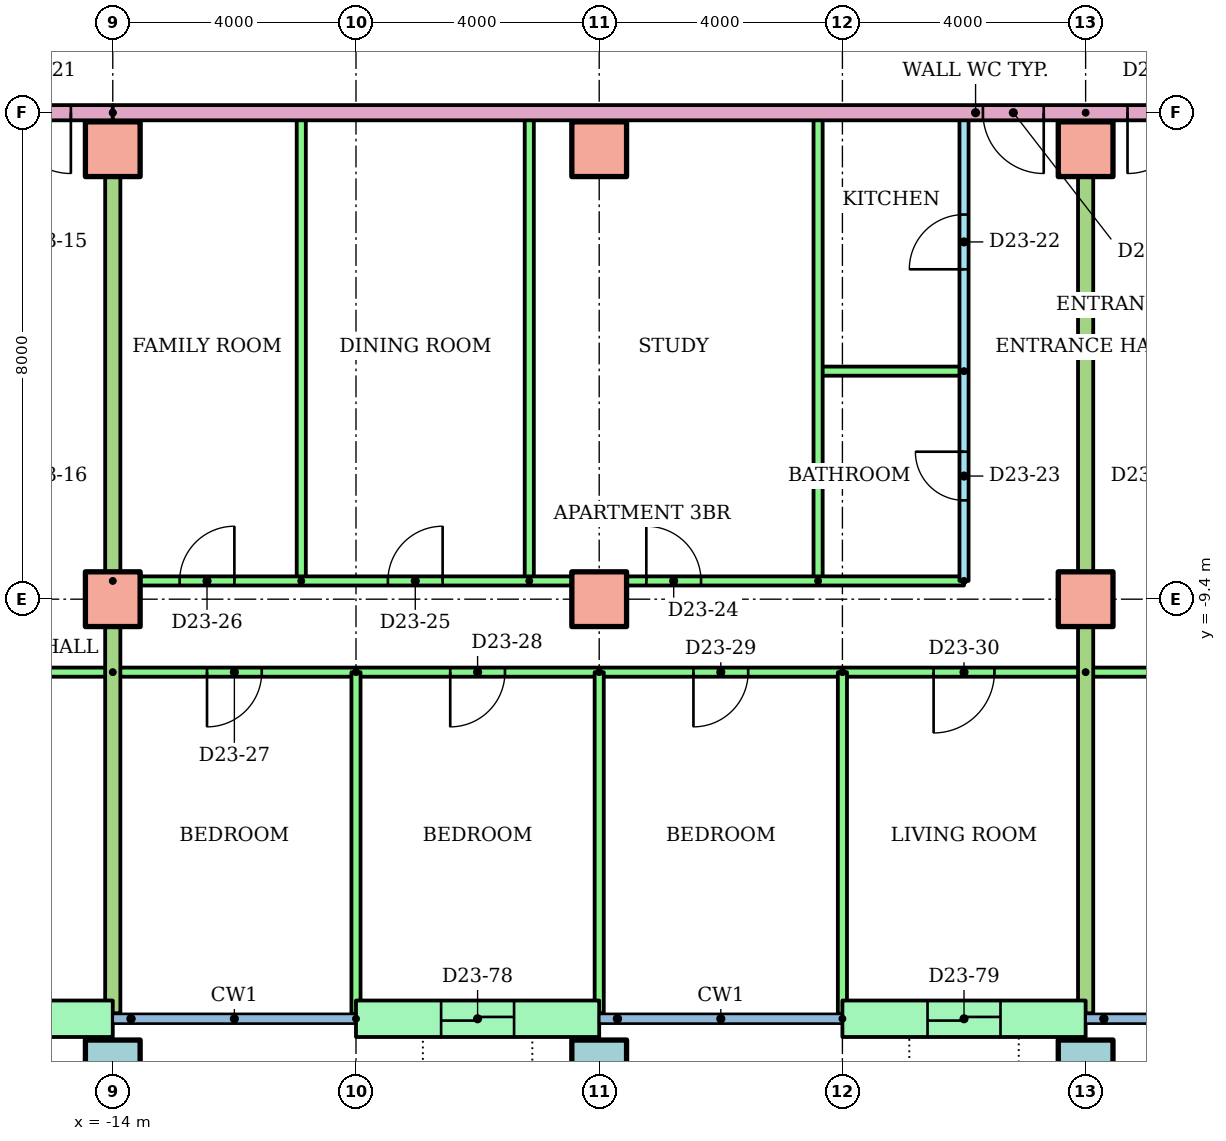
"""IFC4 building model, lengths in metres.
Left out: names, types, materials, properties, quantities, classifications, styles, units other than length and angle.
Written with IfcOpenShell. Run it as: python <this file> out.ifc"""

import sys

from ifc_helpers import new_model, si_unit, direction, frame, frame_2d, origin, origin_2d, place, context, subcontext, project, spatial, rectangle, hollow_rectangle, extrude, element, fill, save


model = new_model("IFC4")
c1 = context("Model", 3, precision=1e-05, world=origin(), true_north=direction((0.0, 1.0)))
c2 = subcontext(c1, "Body", "Model", "MODEL_VIEW")
j1 = project(units=[si_unit("LENGTHUNIT", "METRE"), si_unit("PLANEANGLEUNIT", "RADIAN")], contexts=[c1])
p1 = place(None, origin())
s1 = spatial("IfcSite", under=j1, at=p1, CompositionType="ELEMENT")
p2 = place(p1, origin())
s2 = spatial("IfcBuilding", under=s1, at=p2, CompositionType="ELEMENT")
p3 = place(p2, frame((0.0, 0.0, 90.3)))
s3 = spatial("IfcBuildingStorey", under=s2, at=p3, CompositionType="ELEMENT", Elevation=90.3)
for number, where in (
    (1, (-14.0, -17.1, 0.0)),
    (2, (-6.0, -17.1, 0.0)),
    (3, (2.0, -17.1, 0.0)),
):
    element("IfcColumn", number, at=place(p3, frame(where)), inside=s3, PredefinedType="COLUMN", context=c2, shape_type="SweptSolid", body=[
        extrude(hollow_rectangle(XDim=0.9, YDim=0.9, WallThickness=0.045, at=origin_2d()), origin(), (0.0, 0.0, 1.0), 3.2),
    ])
for number, where in (
    (4, (-14.0, -9.4, 0.0)),
    (5, (-6.0, -9.4, 0.0)),
    (6, (2.0, -9.4, 0.0)),
    (7, (-14.0, -2.0, 0.0)),
    (8, (-6.0, -2.0, 0.0)),
    (9, (2.0, -2.0, 0.0)),
):
    element("IfcColumn", number, at=place(p3, frame(where)), inside=s3, PredefinedType="COLUMN", context=c2, shape_type="SweptSolid", body=[
        extrude(rectangle(XDim=0.9, YDim=0.9, at=origin_2d()), origin(), (0.0, 0.0, 1.0), 3.2),
    ])
p4 = place(p3, frame((-18.0, -16.3, 0.0)))
e10 = element("IfcWall", 10, at=p4, inside=s3, PredefinedType="STANDARD", context=c2, shape_type="SweptSolid", body=[
    extrude(rectangle(XDim=4.0, YDim=0.6, at=frame_2d((2.0, 0.0))), origin(), (0.0, 0.0, 1.0), 2.92),
])
p5 = place(p4, frame((1.4, 0.0, 0.0)))
e11 = element("IfcOpeningElement", 11, at=p5, cuts=e10, PredefinedType="OPENING", context=c2, shape_type="SweptSolid", body=[
    extrude(rectangle(XDim=1.2, YDim=2.1, at=frame_2d((0.6, 1.05))), frame((0.0, 0.31, 0.0), z_axis=(0.0, -1.0, 0.0), x_axis=(1.0, 0.0, 0.0)), (0.0, 0.0, 1.0), 0.62),
])
p6 = place(p3, frame((-10.0, -16.3, 0.0)))
e12 = element("IfcWall", 12, at=p6, inside=s3, PredefinedType="STANDARD", context=c2, shape_type="SweptSolid", body=[
    extrude(rectangle(XDim=4.0, YDim=0.6, at=frame_2d((2.0, 0.0))), origin(), (0.0, 0.0, 1.0), 2.92),
])
p7 = place(p6, frame((1.4, 0.0, 0.0)))
e13 = element("IfcOpeningElement", 13, at=p7, cuts=e12, PredefinedType="OPENING", context=c2, shape_type="SweptSolid", body=[
    extrude(rectangle(XDim=1.2, YDim=2.1, at=frame_2d((0.6, 1.05))), frame((0.0, 0.31, 0.0), z_axis=(0.0, -1.0, 0.0), x_axis=(1.0, 0.0, 0.0)), (0.0, 0.0, 1.0), 0.62),
])
p8 = place(p3, frame((-2.0, -16.3, 0.0)))
e14 = element("IfcWall", 14, at=p8, inside=s3, PredefinedType="STANDARD", context=c2, shape_type="SweptSolid", body=[
    extrude(rectangle(XDim=4.0, YDim=0.6, at=frame_2d((2.0, 0.0))), origin(), (0.0, 0.0, 1.0), 2.92),
])
p9 = place(p8, frame((1.4, 0.0, 0.0)))
e15 = element("IfcOpeningElement", 15, at=p9, cuts=e14, PredefinedType="OPENING", context=c2, shape_type="SweptSolid", body=[
    extrude(rectangle(XDim=1.2, YDim=2.1, at=frame_2d((0.6, 1.05))), frame((0.0, 0.31, 0.0), z_axis=(0.0, -1.0, 0.0), x_axis=(1.0, 0.0, 0.0)), (0.0, 0.0, 1.0), 0.62),
])
p10 = place(p3, frame((-14.0, -10.6, 0.0), z_axis=(0.0, 0.0, 1.0), x_axis=(-1.0, 0.0, 0.0)))
e16 = element("IfcWall", 16, at=p10, inside=s3, PredefinedType="PARTITIONING", context=c2, shape_type="SweptSolid", body=[
    extrude(rectangle(XDim=14.62, YDim=0.15, at=frame_2d((7.31, 0.0))), origin(), (0.0, 0.0, 1.0), 2.4),
])
p11 = place(p10, frame((11.7, 0.0, 0.0)))
e17 = element("IfcOpeningElement", 17, at=p11, cuts=e16, PredefinedType="OPENING", context=c2, shape_type="SweptSolid", body=[
    extrude(rectangle(XDim=0.9, YDim=2.1, at=frame_2d((0.45, 1.05))), frame((0.0, 0.085, 0.0), z_axis=(0.0, -1.0, 0.0), x_axis=(1.0, 0.0, 0.0)), (0.0, 0.0, 1.0), 0.17),
])
p12 = place(p10, frame((4.45, 0.0, 0.0)))
e18 = element("IfcOpeningElement", 18, at=p12, cuts=e16, PredefinedType="OPENING", context=c2, shape_type="SweptSolid", body=[
    extrude(rectangle(XDim=1.0, YDim=2.1, at=frame_2d((0.5, 1.05))), frame((0.0, 0.085, 0.0), z_axis=(0.0, -1.0, 0.0), x_axis=(1.0, 0.0, 0.0)), (0.0, 0.0, 1.0), 0.17),
])
p13 = place(p3, frame((0.0, -9.1, 0.0), z_axis=(0.0, 0.0, 1.0), x_axis=(0.0, 1.0, 0.0)))
e19 = element("IfcWall", 19, at=p13, inside=s3, PredefinedType="PARTITIONING", context=c2, shape_type="SweptSolid", body=[
    extrude(rectangle(XDim=7.7, YDim=0.15, at=frame_2d((3.85, 0.0))), origin(), (0.0, 0.0, 1.0), 2.4),
])
p14 = place(p13, frame((5.125, 0.0, 0.0)))
e20 = element("IfcOpeningElement", 20, at=p14, cuts=e19, PredefinedType="OPENING", context=c2, shape_type="SweptSolid", body=[
    extrude(rectangle(XDim=0.9, YDim=2.1, at=frame_2d((0.45, 1.05))), frame((0.0, 0.085, 0.0), z_axis=(0.0, -1.0, 0.0), x_axis=(1.0, 0.0, 0.0)), (0.0, 0.0, 1.0), 0.17),
])
p15 = place(p13, frame((1.325, 0.0, 0.0)))
e21 = element("IfcOpeningElement", 21, at=p15, cuts=e19, PredefinedType="OPENING", context=c2, shape_type="SweptSolid", body=[
    extrude(rectangle(XDim=0.8, YDim=2.1, at=frame_2d((0.4, 1.05))), frame((0.0, 0.085, 0.0), z_axis=(0.0, -1.0, 0.0), x_axis=(1.0, 0.0, 0.0)), (0.0, 0.0, 1.0), 0.17),
])
p16 = place(p3, frame((0.0, -5.65, 0.0), z_axis=(0.0, 0.0, 1.0), x_axis=(-1.0, 0.0, 0.0)))
e22 = element("IfcWall", 22, at=p16, inside=s3, PredefinedType="PARTITIONING", context=c2, shape_type="SweptSolid", body=[
    extrude(rectangle(XDim=2.4, YDim=0.15, at=frame_2d((1.2, 0.0))), origin(), (0.0, 0.0, 1.0), 2.4),
])
for number, where, z_axis, x_axis in (
    (23, (-2.4, -9.1, 0.0), (0.0, 0.0, 1.0), (0.0, 1.0, 0.0)),
    (24, (-7.15, -9.1, 0.0), (0.0, 0.0, 1.0), (0.0, 1.0, 0.0)),
    (25, (-10.9, -9.1, 0.0), (0.0, 0.0, 1.0), (0.0, 1.0, 0.0)),
):
    element("IfcWall", number, at=place(p3, frame(where, z_axis=z_axis, x_axis=x_axis)), inside=s3, PredefinedType="PARTITIONING", context=c2, shape_type="SweptSolid", body=[
        extrude(rectangle(XDim=7.7, YDim=0.15, at=frame_2d((3.85, 0.0))), origin(), (0.0, 0.0, 1.0), 2.4),
    ])
p17 = place(p3, frame((-14.0, -9.1, 0.0)))
e26 = element("IfcWall", 26, at=p17, inside=s3, PredefinedType="PARTITIONING", context=c2, shape_type="SweptSolid", body=[
    extrude(rectangle(XDim=14.0, YDim=0.15, at=frame_2d((7.0, 0.0))), origin(), (0.0, 0.0, 1.0), 2.4),
])
p18 = place(p17, frame((8.775, 0.0, 0.0)))
e27 = element("IfcOpeningElement", 27, at=p18, cuts=e26, PredefinedType="OPENING", context=c2, shape_type="SweptSolid", body=[
    extrude(rectangle(XDim=0.9, YDim=2.1, at=frame_2d((0.45, 1.05))), frame((0.0, 0.085, 0.0), z_axis=(0.0, -1.0, 0.0), x_axis=(1.0, 0.0, 0.0)), (0.0, 0.0, 1.0), 0.17),
])
p19 = place(p17, frame((4.525, 0.0, 0.0)))
e28 = element("IfcOpeningElement", 28, at=p19, cuts=e26, PredefinedType="OPENING", context=c2, shape_type="SweptSolid", body=[
    extrude(rectangle(XDim=0.9, YDim=2.1, at=frame_2d((0.45, 1.05))), frame((0.0, 0.085, 0.0), z_axis=(0.0, -1.0, 0.0), x_axis=(1.0, 0.0, 0.0)), (0.0, 0.0, 1.0), 0.17),
])
p20 = place(p17, frame((1.1, 0.0, 0.0)))
e29 = element("IfcOpeningElement", 29, at=p20, cuts=e26, PredefinedType="OPENING", context=c2, shape_type="SweptSolid", body=[
    extrude(rectangle(XDim=0.9, YDim=2.1, at=frame_2d((0.45, 1.05))), frame((0.0, 0.085, 0.0), z_axis=(0.0, -1.0, 0.0), x_axis=(1.0, 0.0, 0.0)), (0.0, 0.0, 1.0), 0.17),
])
p21 = place(p3, frame((2.0, -10.6, 0.0), z_axis=(0.0, 0.0, 1.0), x_axis=(-1.0, 0.0, 0.0)))
e30 = element("IfcWall", 30, at=p21, inside=s3, PredefinedType="PARTITIONING", context=c2, shape_type="SweptSolid", body=[
    extrude(rectangle(XDim=16.0, YDim=0.15, at=frame_2d((8.0, 0.0))), origin(), (0.0, 0.0, 1.0), 2.4),
])
p22 = place(p21, frame((13.55, 0.0, 0.0)))
e31 = element("IfcOpeningElement", 31, at=p22, cuts=e30, PredefinedType="OPENING", context=c2, shape_type="SweptSolid", body=[
    extrude(rectangle(XDim=0.9, YDim=2.1, at=frame_2d((0.45, 1.05))), frame((0.0, 0.085, 0.0), z_axis=(0.0, -1.0, 0.0), x_axis=(1.0, 0.0, 0.0)), (0.0, 0.0, 1.0), 0.17),
])
p23 = place(p21, frame((9.55, 0.0, 0.0)))
e32 = element("IfcOpeningElement", 32, at=p23, cuts=e30, PredefinedType="OPENING", context=c2, shape_type="SweptSolid", body=[
    extrude(rectangle(XDim=0.9, YDim=2.1, at=frame_2d((0.45, 1.05))), frame((0.0, 0.085, 0.0), z_axis=(0.0, -1.0, 0.0), x_axis=(1.0, 0.0, 0.0)), (0.0, 0.0, 1.0), 0.17),
])
p24 = place(p21, frame((5.55, 0.0, 0.0)))
e33 = element("IfcOpeningElement", 33, at=p24, cuts=e30, PredefinedType="OPENING", context=c2, shape_type="SweptSolid", body=[
    extrude(rectangle(XDim=0.9, YDim=2.1, at=frame_2d((0.45, 1.05))), frame((0.0, 0.085, 0.0), z_axis=(0.0, -1.0, 0.0), x_axis=(1.0, 0.0, 0.0)), (0.0, 0.0, 1.0), 0.17),
])
p25 = place(p21, frame((1.5, 0.0, 0.0)))
e34 = element("IfcOpeningElement", 34, at=p25, cuts=e30, PredefinedType="OPENING", context=c2, shape_type="SweptSolid", body=[
    extrude(rectangle(XDim=1.0, YDim=2.1, at=frame_2d((0.5, 1.05))), frame((0.0, 0.085, 0.0), z_axis=(0.0, -1.0, 0.0), x_axis=(1.0, 0.0, 0.0)), (0.0, 0.0, 1.0), 0.17),
])
p26 = place(p3, frame((-10.0, -10.6, 0.0), z_axis=(0.0, 0.0, 1.0), x_axis=(0.0, -1.0, 0.0)))
e35 = element("IfcWall", 35, at=p26, inside=s3, PredefinedType="PARTITIONING", context=c2, shape_type="SweptSolid", body=[
    extrude(rectangle(XDim=5.621, YDim=0.15, at=frame_2d((2.811, 0.0))), origin(), (0.0, 0.0, 1.0), 2.4),
])
p27 = place(p3, frame((-6.0, -10.6, 0.0), z_axis=(0.0, 0.0, 1.0), x_axis=(0.0, -1.0, 0.0)))
e36 = element("IfcWall", 36, at=p27, inside=s3, PredefinedType="PARTITIONING", context=c2, shape_type="SweptSolid", body=[
    extrude(rectangle(XDim=5.61, YDim=0.15, at=frame_2d((2.805, 0.0))), origin(), (0.0, 0.0, 1.0), 2.4),
])
p28 = place(p3, frame((-2.0, -10.6, 0.0), z_axis=(0.0, 0.0, 1.0), x_axis=(0.0, -1.0, 0.0)))
e37 = element("IfcWall", 37, at=p28, inside=s3, PredefinedType="PARTITIONING", context=c2, shape_type="SweptSolid", body=[
    extrude(rectangle(XDim=5.621, YDim=0.15, at=frame_2d((2.811, 0.0))), origin(), (0.0, 0.0, 1.0), 2.4),
])
p29 = place(p3, frame((-14.0, -1.4, 0.0), z_axis=(0.0, 0.0, 1.0), x_axis=(0.0, -1.0, 0.0)))
e38 = element("IfcWall", 38, at=p29, inside=s3, PredefinedType="PARTITIONING", context=c2, shape_type="SweptSolid", body=[
    extrude(rectangle(XDim=14.81, YDim=0.25, at=frame_2d((7.405, 0.0))), origin(), (0.0, 0.0, 1.0), 2.4),
])
p30 = place(p3, frame((18.0, -10.6, 0.0), z_axis=(0.0, 0.0, 1.0), x_axis=(-1.0, 0.0, 0.0)))
e39 = element("IfcWall", 39, at=p30, inside=s3, PredefinedType="PARTITIONING", context=c2, shape_type="SweptSolid", body=[
    extrude(rectangle(XDim=16.0, YDim=0.15, at=frame_2d((8.0, 0.0))), origin(), (0.0, 0.0, 1.0), 2.4),
])
p31 = place(p30, frame((13.55, 0.0, 0.0)))
e40 = element("IfcOpeningElement", 40, at=p31, cuts=e39, PredefinedType="OPENING", context=c2, shape_type="SweptSolid", body=[
    extrude(rectangle(XDim=0.9, YDim=2.1, at=frame_2d((0.45, 1.05))), frame((0.0, 0.085, 0.0), z_axis=(0.0, -1.0, 0.0), x_axis=(1.0, 0.0, 0.0)), (0.0, 0.0, 1.0), 0.17),
])
p32 = place(p30, frame((9.55, 0.0, 0.0)))
e41 = element("IfcOpeningElement", 41, at=p32, cuts=e39, PredefinedType="OPENING", context=c2, shape_type="SweptSolid", body=[
    extrude(rectangle(XDim=0.9, YDim=2.1, at=frame_2d((0.45, 1.05))), frame((0.0, 0.085, 0.0), z_axis=(0.0, -1.0, 0.0), x_axis=(1.0, 0.0, 0.0)), (0.0, 0.0, 1.0), 0.17),
])
p33 = place(p30, frame((5.55, 0.0, 0.0)))
e42 = element("IfcOpeningElement", 42, at=p33, cuts=e39, PredefinedType="OPENING", context=c2, shape_type="SweptSolid", body=[
    extrude(rectangle(XDim=0.9, YDim=2.1, at=frame_2d((0.45, 1.05))), frame((0.0, 0.085, 0.0), z_axis=(0.0, -1.0, 0.0), x_axis=(1.0, 0.0, 0.0)), (0.0, 0.0, 1.0), 0.17),
])
p34 = place(p30, frame((1.5, 0.0, 0.0)))
e43 = element("IfcOpeningElement", 43, at=p34, cuts=e39, PredefinedType="OPENING", context=c2, shape_type="SweptSolid", body=[
    extrude(rectangle(XDim=1.0, YDim=2.1, at=frame_2d((0.5, 1.05))), frame((0.0, 0.085, 0.0), z_axis=(0.0, -1.0, 0.0), x_axis=(1.0, 0.0, 0.0)), (0.0, 0.0, 1.0), 0.17),
])
p35 = place(p3, frame((2.0, -1.4, 0.0), z_axis=(0.0, 0.0, 1.0), x_axis=(0.0, -1.0, 0.0)))
e44 = element("IfcWall", 44, at=p35, inside=s3, PredefinedType="PARTITIONING", context=c2, shape_type="SweptSolid", body=[
    extrude(rectangle(XDim=14.81, YDim=0.25, at=frame_2d((7.405, 0.0))), origin(), (0.0, 0.0, 1.0), 2.4),
])
p36 = place(p3, frame((-14.0, -1.4, 0.0), z_axis=(0.0, 0.0, 1.0), x_axis=(-1.0, 0.0, 0.0)))
e45 = element("IfcWall", 45, at=p36, inside=s3, PredefinedType="PARTITIONING", context=c2, shape_type="SweptSolid", body=[
    extrude(rectangle(XDim=14.62, YDim=0.25, at=frame_2d((7.31, 0.0))), origin(), (0.0, 0.0, 1.0), 2.4),
])
p37 = place(p36, frame((0.689, 0.0, 0.0)))
e46 = element("IfcOpeningElement", 46, at=p37, cuts=e45, PredefinedType="OPENING", context=c2, shape_type="SweptSolid", body=[
    extrude(rectangle(XDim=1.0, YDim=2.1, at=frame_2d((0.5, 1.05))), frame((0.0, 0.135, 0.0), z_axis=(0.0, -1.0, 0.0), x_axis=(1.0, 0.0, 0.0)), (0.0, 0.0, 1.0), 0.27),
])
p38 = place(p3, frame((14.0, -1.4, 0.0), z_axis=(0.0, 0.0, 1.0), x_axis=(-1.0, 0.0, 0.0)))
e47 = element("IfcWall", 47, at=p38, inside=s3, PredefinedType="PARTITIONING", context=c2, shape_type="SweptSolid", body=[
    extrude(rectangle(XDim=28.0, YDim=0.25, at=frame_2d((14.0, 0.0))), origin(), (0.0, 0.0, 1.0), 2.4),
])
p39 = place(p38, frame((12.689, 0.0, 0.0)))
e48 = element("IfcOpeningElement", 48, at=p39, cuts=e47, PredefinedType="OPENING", context=c2, shape_type="SweptSolid", body=[
    extrude(rectangle(XDim=1.0, YDim=2.1, at=frame_2d((0.5, 1.05))), frame((0.0, 0.135, 0.0), z_axis=(0.0, -1.0, 0.0), x_axis=(1.0, 0.0, 0.0)), (0.0, 0.0, 1.0), 0.27),
])
p40 = place(p38, frame((10.311, 0.0, 0.0)))
e49 = element("IfcOpeningElement", 49, at=p40, cuts=e47, PredefinedType="OPENING", context=c2, shape_type="SweptSolid", body=[
    extrude(rectangle(XDim=1.0, YDim=2.1, at=frame_2d((0.5, 1.05))), frame((0.0, 0.135, 0.0), z_axis=(0.0, -1.0, 0.0), x_axis=(1.0, 0.0, 0.0)), (0.0, 0.0, 1.0), 0.27),
])
p41 = place(p37, origin())
e50 = element("IfcDoor", 50, at=p41, inside=s3, OperationType="SINGLE_SWING_LEFT", PredefinedType="DOOR", context=c2, shape_type="SweptSolid", body=[
    extrude(rectangle(XDim=1.0, YDim=2.1, at=frame_2d((0.5, 1.05))), frame((0.0, 0.025, 0.0), z_axis=(0.0, -1.0, 0.0), x_axis=(1.0, 0.0, 0.0)), (0.0, 0.0, 1.0), 0.05),
])
fill(e46, e50)
p42 = place(p14, origin())
e51 = element("IfcDoor", 51, at=p42, inside=s3, OperationType="SINGLE_SWING_LEFT", PredefinedType="DOOR", context=c2, shape_type="SweptSolid", body=[
    extrude(rectangle(XDim=0.9, YDim=2.1, at=frame_2d((0.45, 1.05))), frame((0.0, 0.025, 0.0), z_axis=(0.0, -1.0, 0.0), x_axis=(1.0, 0.0, 0.0)), (0.0, 0.0, 1.0), 0.05),
])
fill(e20, e51)
p43 = place(p15, origin())
e52 = element("IfcDoor", 52, at=p43, inside=s3, OperationType="SINGLE_SWING_RIGHT", PredefinedType="DOOR", context=c2, shape_type="SweptSolid", body=[
    extrude(rectangle(XDim=0.8, YDim=2.1, at=frame_2d((0.4, 1.05))), frame((0.0, 0.025, 0.0), z_axis=(0.0, -1.0, 0.0), x_axis=(1.0, 0.0, 0.0)), (0.0, 0.0, 1.0), 0.05),
])
fill(e21, e52)
p44 = place(p18, origin())
e53 = element("IfcDoor", 53, at=p44, inside=s3, OperationType="SINGLE_SWING_LEFT", PredefinedType="DOOR", context=c2, shape_type="SweptSolid", body=[
    extrude(rectangle(XDim=0.9, YDim=2.1, at=frame_2d((0.45, 1.05))), frame((0.0, 0.025, 0.0), z_axis=(0.0, -1.0, 0.0), x_axis=(1.0, 0.0, 0.0)), (0.0, 0.0, 1.0), 0.05),
])
fill(e27, e53)
p45 = place(p19, origin())
e54 = element("IfcDoor", 54, at=p45, inside=s3, OperationType="SINGLE_SWING_RIGHT", PredefinedType="DOOR", context=c2, shape_type="SweptSolid", body=[
    extrude(rectangle(XDim=0.9, YDim=2.1, at=frame_2d((0.45, 1.05))), frame((0.0, 0.025, 0.0), z_axis=(0.0, -1.0, 0.0), x_axis=(1.0, 0.0, 0.0)), (0.0, 0.0, 1.0), 0.05),
])
fill(e28, e54)
p46 = place(p20, origin())
e55 = element("IfcDoor", 55, at=p46, inside=s3, OperationType="SINGLE_SWING_RIGHT", PredefinedType="DOOR", context=c2, shape_type="SweptSolid", body=[
    extrude(rectangle(XDim=0.9, YDim=2.1, at=frame_2d((0.45, 1.05))), frame((0.0, 0.025, 0.0), z_axis=(0.0, -1.0, 0.0), x_axis=(1.0, 0.0, 0.0)), (0.0, 0.0, 1.0), 0.05),
])
fill(e29, e55)
p47 = place(p22, origin())
e56 = element("IfcDoor", 56, at=p47, inside=s3, OperationType="SINGLE_SWING_RIGHT", PredefinedType="DOOR", context=c2, shape_type="SweptSolid", body=[
    extrude(rectangle(XDim=0.9, YDim=2.1, at=frame_2d((0.45, 1.05))), frame((0.0, 0.025, 0.0), z_axis=(0.0, -1.0, 0.0), x_axis=(1.0, 0.0, 0.0)), (0.0, 0.0, 1.0), 0.05),
])
fill(e31, e56)
p48 = place(p23, origin())
e57 = element("IfcDoor", 57, at=p48, inside=s3, OperationType="SINGLE_SWING_RIGHT", PredefinedType="DOOR", context=c2, shape_type="SweptSolid", body=[
    extrude(rectangle(XDim=0.9, YDim=2.1, at=frame_2d((0.45, 1.05))), frame((0.0, 0.025, 0.0), z_axis=(0.0, -1.0, 0.0), x_axis=(1.0, 0.0, 0.0)), (0.0, 0.0, 1.0), 0.05),
])
fill(e32, e57)
p49 = place(p24, origin())
e58 = element("IfcDoor", 58, at=p49, inside=s3, OperationType="SINGLE_SWING_RIGHT", PredefinedType="DOOR", context=c2, shape_type="SweptSolid", body=[
    extrude(rectangle(XDim=0.9, YDim=2.1, at=frame_2d((0.45, 1.05))), frame((0.0, 0.025, 0.0), z_axis=(0.0, -1.0, 0.0), x_axis=(1.0, 0.0, 0.0)), (0.0, 0.0, 1.0), 0.05),
])
fill(e33, e58)
p50 = place(p25, origin())
e59 = element("IfcDoor", 59, at=p50, inside=s3, OperationType="SINGLE_SWING_RIGHT", PredefinedType="DOOR", context=c2, shape_type="SweptSolid", body=[
    extrude(rectangle(XDim=1.0, YDim=2.1, at=frame_2d((0.5, 1.05))), frame((0.0, 0.025, 0.0), z_axis=(0.0, -1.0, 0.0), x_axis=(1.0, 0.0, 0.0)), (0.0, 0.0, 1.0), 0.05),
])
fill(e34, e59)
p51 = place(p39, origin())
e60 = element("IfcDoor", 60, at=p51, inside=s3, OperationType="SINGLE_SWING_LEFT", PredefinedType="DOOR", context=c2, shape_type="SweptSolid", body=[
    extrude(rectangle(XDim=1.0, YDim=2.1, at=frame_2d((0.5, 1.05))), frame((0.0, 0.025, 0.0), z_axis=(0.0, -1.0, 0.0), x_axis=(1.0, 0.0, 0.0)), (0.0, 0.0, 1.0), 0.05),
])
fill(e48, e60)
p52 = place(p40, origin())
e61 = element("IfcDoor", 61, at=p52, inside=s3, OperationType="SINGLE_SWING_RIGHT", PredefinedType="DOOR", context=c2, shape_type="SweptSolid", body=[
    extrude(rectangle(XDim=1.0, YDim=2.1, at=frame_2d((0.5, 1.05))), frame((0.0, 0.025, 0.0), z_axis=(0.0, -1.0, 0.0), x_axis=(1.0, 0.0, 0.0)), (0.0, 0.0, 1.0), 0.05),
])
fill(e49, e61)
p53 = place(p7, origin())
e62 = element("IfcDoor", 62, at=p53, inside=s3, OperationType="SLIDING_TO_LEFT", PredefinedType="DOOR", context=c2, shape_type="SweptSolid", body=[
    extrude(rectangle(XDim=1.2, YDim=2.1, at=frame_2d((0.6, 1.05))), frame((0.0, 0.025, 0.0), z_axis=(0.0, -1.0, 0.0), x_axis=(1.0, 0.0, 0.0)), (0.0, 0.0, 1.0), 0.05),
])
fill(e13, e62)
p54 = place(p9, origin())
e63 = element("IfcDoor", 63, at=p54, inside=s3, OperationType="SLIDING_TO_LEFT", PredefinedType="DOOR", context=c2, shape_type="SweptSolid", body=[
    extrude(rectangle(XDim=1.2, YDim=2.1, at=frame_2d((0.6, 1.05))), frame((0.0, 0.025, 0.0), z_axis=(0.0, -1.0, 0.0), x_axis=(1.0, 0.0, 0.0)), (0.0, 0.0, 1.0), 0.05),
])
fill(e15, e63)
save(model, sys.argv[1])
